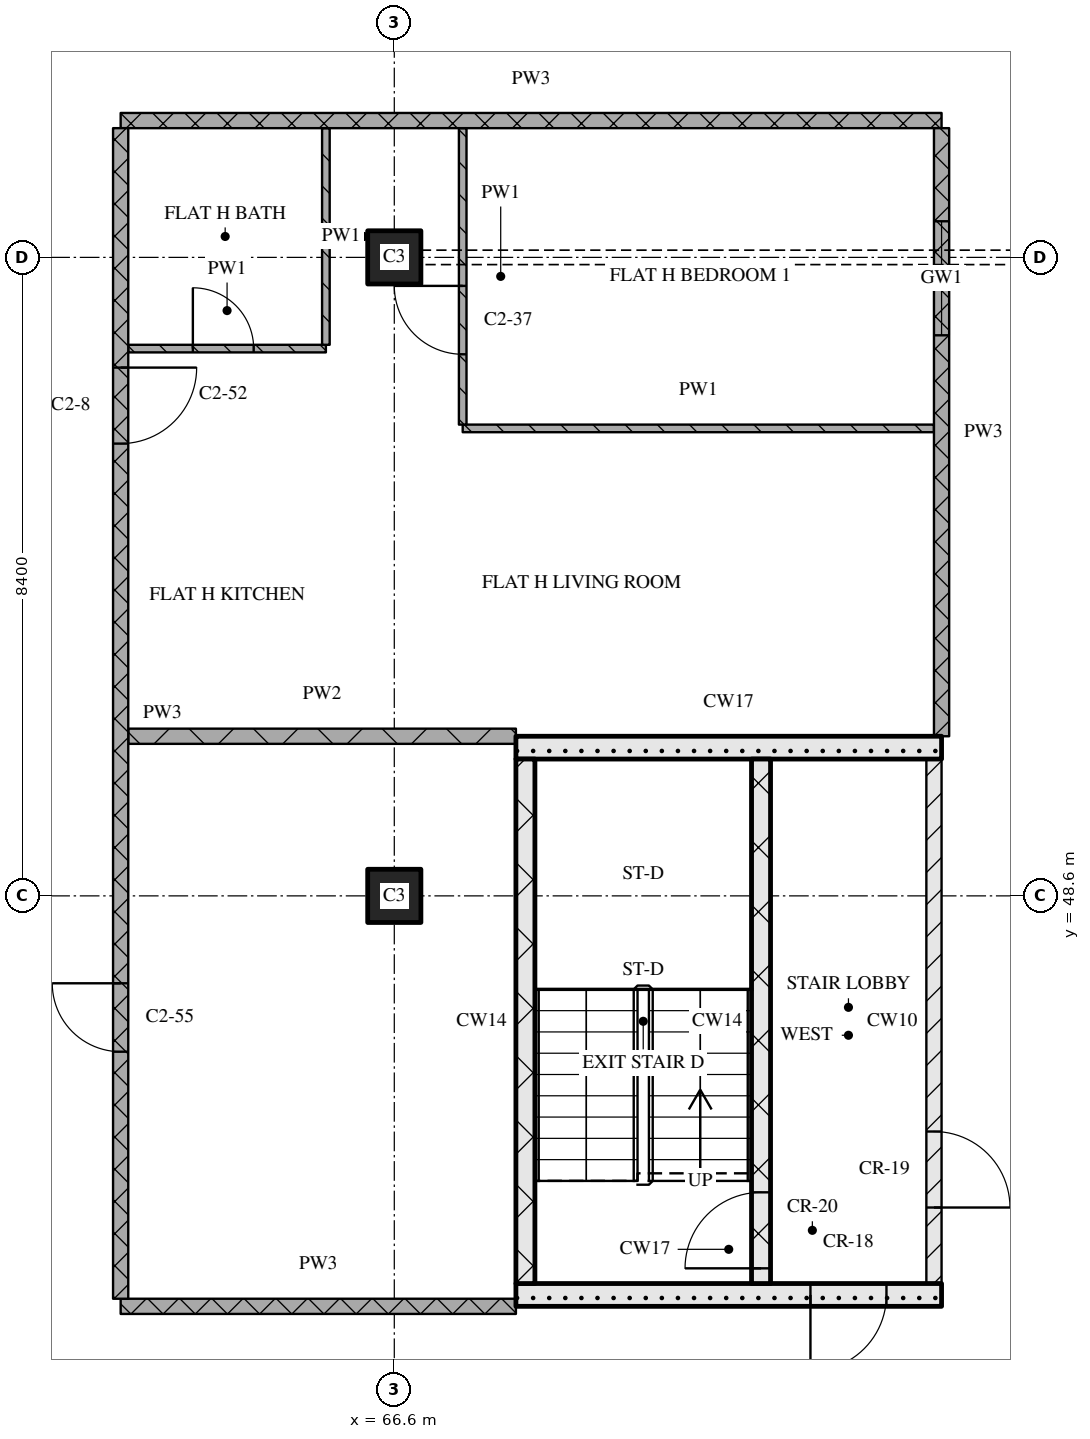
"""IFC4 building model, lengths in metres.
Left out: names, types, materials, properties, quantities, classifications, styles, units other than length and angle.
Written with IfcOpenShell. Run it as: python <this file> out.ifc"""

import sys

from ifc_helpers import new_model, si_unit, direction, frame, frame_2d, origin, origin_2d, place, context, subcontext, project, spatial, rectangle, extrude, element, fill, save


model = new_model("IFC4")
c1 = context("Model", 3, precision=1e-05, world=origin(), true_north=direction((0.0, 1.0)))
c2 = subcontext(c1, "Body", "Model", "MODEL_VIEW")
j1 = project(units=[si_unit("LENGTHUNIT", "METRE"), si_unit("PLANEANGLEUNIT", "RADIAN")], contexts=[c1])
p1 = place(None, origin())
s1 = spatial("IfcSite", under=j1, at=p1, CompositionType="ELEMENT")
p2 = place(p1, origin())
s2 = spatial("IfcBuilding", under=s1, at=p2, CompositionType="ELEMENT")
p3 = place(p2, frame((0.0, 0.0, 158.25)))
s3 = spatial("IfcBuildingStorey", under=s2, at=p3, CompositionType="ELEMENT", Elevation=158.25)
for number, where, z_axis, x_axis in (
    (1, (66.6, 48.6, 0.0), (0.0, 0.0, 1.0), (1.0, 0.0, 0.0)),
    (2, (66.6, 57.0, 0.0), (0.0, 0.0, 1.0), (1.0, 0.0, 0.0)),
):
    element("IfcColumn", number, at=place(p3, frame(where, z_axis=z_axis, x_axis=x_axis)), inside=s3, PredefinedType="COLUMN", context=c2, shape_type="SweptSolid", body=[
        extrude(rectangle(XDim=0.7, YDim=0.7, at=origin_2d()), origin(), (0.0, 0.0, 1.0), 3.6),
    ])
p4 = place(p3, frame((68.2, 43.35, 0.0), z_axis=(0.0, 0.0, 1.0), x_axis=(1.0, 0.0, 0.0)))
e3 = element("IfcWall", 3, at=p4, inside=s3, PredefinedType="SOLIDWALL", context=c2, shape_type="SweptSolid", body=[
    extrude(rectangle(XDim=5.6, YDim=0.3, at=frame_2d((2.8, 0.0))), origin(), (0.0, 0.0, 1.0), 3.32),
])
p5 = place(p4, frame((3.875, 0.0, 0.0)))
e4 = element("IfcOpeningElement", 4, at=p5, cuts=e3, PredefinedType="OPENING", context=c2, shape_type="SweptSolid", body=[
    extrude(rectangle(XDim=1.0, YDim=2.1, at=frame_2d((0.5, 1.05))), frame((0.0, 0.16, 0.0), z_axis=(0.0, -1.0, 0.0), x_axis=(1.0, 0.0, 0.0)), (0.0, 0.0, 1.0), 0.32),
])
p6 = place(p3, frame((68.325, 43.5, 0.0), z_axis=(0.0, 0.0, 1.0), x_axis=(0.0, 1.0, 0.0)))
e5 = element("IfcWall", 5, at=p6, inside=s3, PredefinedType="SOLIDWALL", context=c2, shape_type="SweptSolid", body=[
    extrude(rectangle(XDim=6.9, YDim=0.25, at=frame_2d((3.45, 0.0))), origin(), (0.0, 0.0, 1.0), 3.32),
])
p7 = place(p3, frame((71.425, 43.5, 0.0), z_axis=(0.0, 0.0, 1.0), x_axis=(0.0, 1.0, 0.0)))
e6 = element("IfcWall", 6, at=p7, inside=s3, PredefinedType="SOLIDWALL", context=c2, shape_type="SweptSolid", body=[
    extrude(rectangle(XDim=6.9, YDim=0.25, at=frame_2d((3.45, 0.0))), origin(), (0.0, 0.0, 1.0), 3.32),
])
p8 = place(p7, frame((0.2, 0.0, 0.0)))
e7 = element("IfcOpeningElement", 7, at=p8, cuts=e6, PredefinedType="OPENING", context=c2, shape_type="SweptSolid", body=[
    extrude(rectangle(XDim=1.0, YDim=2.1, at=frame_2d((0.5, 1.05))), frame((0.0, 0.135, 0.0), z_axis=(0.0, -1.0, 0.0), x_axis=(1.0, 0.0, 0.0)), (0.0, 0.0, 1.0), 0.27),
])
p9 = place(p3, frame((73.7, 43.5, 0.0), z_axis=(0.0, 0.0, 1.0), x_axis=(0.0, 1.0, 0.0)))
e8 = element("IfcWall", 8, at=p9, inside=s3, PredefinedType="PARTITIONING", context=c2, shape_type="SweptSolid", body=[
    extrude(rectangle(XDim=6.9, YDim=0.2, at=frame_2d((3.45, 0.0))), origin(), (0.0, 0.0, 1.0), 3.32),
])
p10 = place(p9, frame((1.0, 0.0, 0.0)))
e9 = element("IfcOpeningElement", 9, at=p10, cuts=e8, PredefinedType="OPENING", context=c2, shape_type="SweptSolid", body=[
    extrude(rectangle(XDim=1.0, YDim=2.1, at=frame_2d((0.5, 1.05))), frame((0.0, 0.11, 0.0), z_axis=(0.0, -1.0, 0.0), x_axis=(1.0, 0.0, 0.0)), (0.0, 0.0, 1.0), 0.22),
])
p11 = place(p3, frame((68.2, 50.55, 0.0), z_axis=(0.0, 0.0, 1.0), x_axis=(1.0, 0.0, 0.0)))
e10 = element("IfcWall", 10, at=p11, inside=s3, PredefinedType="SOLIDWALL", context=c2, shape_type="SweptSolid", body=[
    extrude(rectangle(XDim=5.6, YDim=0.3, at=frame_2d((2.8, 0.0))), origin(), (0.0, 0.0, 1.0), 3.32),
])
p12 = place(p3, frame((63.0, 43.2, 0.0), z_axis=(0.0, 0.0, 1.0), x_axis=(1.0, 0.0, 0.0)))
e11 = element("IfcWall", 11, at=p12, inside=s3, PredefinedType="PARTITIONING", context=c2, shape_type="SweptSolid", body=[
    extrude(rectangle(XDim=5.2, YDim=0.2, at=frame_2d((2.6, 0.0))), origin(), (0.0, 0.0, 1.0), 3.32),
])
p13 = place(p3, frame((63.1, 50.7, 0.0), z_axis=(0.0, 0.0, 1.0), x_axis=(1.0, 0.0, 0.0)))
e12 = element("IfcWall", 12, at=p13, inside=s3, PredefinedType="PARTITIONING", context=c2, shape_type="SweptSolid", body=[
    extrude(rectangle(XDim=5.1, YDim=0.2, at=frame_2d((2.55, 0.0))), origin(), (0.0, 0.0, 1.0), 3.32),
])
p14 = place(p3, frame((67.5, 54.75, 0.0), z_axis=(0.0, 0.0, 1.0), x_axis=(1.0, 0.0, 0.0)))
e13 = element("IfcWall", 13, at=p14, inside=s3, PredefinedType="PARTITIONING", context=c2, shape_type="SweptSolid", body=[
    extrude(rectangle(XDim=6.2, YDim=0.1, at=frame_2d((3.1, 0.0))), origin(), (0.0, 0.0, 1.0), 3.32),
])
p15 = place(p3, frame((63.1, 55.8, 0.0), z_axis=(0.0, 0.0, 1.0), x_axis=(1.0, 0.0, 0.0)))
e14 = element("IfcWall", 14, at=p15, inside=s3, PredefinedType="PARTITIONING", context=c2, shape_type="SweptSolid", body=[
    extrude(rectangle(XDim=2.6, YDim=0.1, at=frame_2d((1.3, 0.0))), origin(), (0.0, 0.0, 1.0), 3.32),
])
p16 = place(p15, frame((0.85, 0.0, 0.0)))
e15 = element("IfcOpeningElement", 15, at=p16, cuts=e14, PredefinedType="OPENING", context=c2, shape_type="SweptSolid", body=[
    extrude(rectangle(XDim=0.8, YDim=2.1, at=frame_2d((0.4, 1.05))), frame((0.0, 0.06, 0.0), z_axis=(0.0, -1.0, 0.0), x_axis=(1.0, 0.0, 0.0)), (0.0, 0.0, 1.0), 0.12),
])
p17 = place(p3, frame((63.0, 58.8, 0.0), z_axis=(0.0, 0.0, 1.0), x_axis=(1.0, 0.0, 0.0)))
e16 = element("IfcWall", 16, at=p17, inside=s3, PredefinedType="PARTITIONING", context=c2, shape_type="SweptSolid", body=[
    extrude(rectangle(XDim=10.8, YDim=0.2, at=frame_2d((5.4, 0.0))), origin(), (0.0, 0.0, 1.0), 3.32),
])
p18 = place(p3, frame((63.0, 58.7, 0.0), z_axis=(0.0, 0.0, 1.0), x_axis=(0.0, -1.0, 0.0)))
e17 = element("IfcWall", 17, at=p18, inside=s3, PredefinedType="PARTITIONING", context=c2, shape_type="SweptSolid", body=[
    extrude(rectangle(XDim=15.4, YDim=0.2, at=frame_2d((7.7, 0.0))), origin(), (0.0, 0.0, 1.0), 3.32),
])
p19 = place(p18, frame((3.15, 0.0, 0.0)))
e18 = element("IfcOpeningElement", 18, at=p19, cuts=e17, PredefinedType="OPENING", context=c2, shape_type="SweptSolid", body=[
    extrude(rectangle(XDim=1.0, YDim=2.1, at=frame_2d((0.5, 1.05))), frame((0.0, 0.11, 0.0), z_axis=(0.0, -1.0, 0.0), x_axis=(1.0, 0.0, 0.0)), (0.0, 0.0, 1.0), 0.22),
])
p20 = place(p18, frame((11.25, 0.0, 0.0)))
e19 = element("IfcOpeningElement", 19, at=p20, cuts=e17, PredefinedType="OPENING", context=c2, shape_type="SweptSolid", body=[
    extrude(rectangle(XDim=0.9, YDim=2.1, at=frame_2d((0.45, 1.05))), frame((0.0, 0.11, 0.0), z_axis=(0.0, -1.0, 0.0), x_axis=(1.0, 0.0, 0.0)), (0.0, 0.0, 1.0), 0.22),
])
p21 = place(p3, frame((65.7, 58.7, 0.0), z_axis=(0.0, 0.0, 1.0), x_axis=(0.0, -1.0, 0.0)))
e20 = element("IfcWall", 20, at=p21, inside=s3, PredefinedType="PARTITIONING", context=c2, shape_type="SweptSolid", body=[
    extrude(rectangle(XDim=2.85, YDim=0.1, at=frame_2d((1.425, 0.0))), origin(), (0.0, 0.0, 1.0), 3.32),
])
p22 = place(p3, frame((67.5, 58.7, 0.0), z_axis=(0.0, 0.0, 1.0), x_axis=(0.0, -1.0, 0.0)))
e21 = element("IfcWall", 21, at=p22, inside=s3, PredefinedType="PARTITIONING", context=c2, shape_type="SweptSolid", body=[
    extrude(rectangle(XDim=3.9, YDim=0.1, at=frame_2d((1.95, 0.0))), origin(), (0.0, 0.0, 1.0), 3.32),
])
p23 = place(p22, frame((2.075, 0.0, 0.0)))
e22 = element("IfcOpeningElement", 22, at=p23, cuts=e21, PredefinedType="OPENING", context=c2, shape_type="SweptSolid", body=[
    extrude(rectangle(XDim=0.9, YDim=2.1, at=frame_2d((0.45, 1.05))), frame((0.0, 0.06, 0.0), z_axis=(0.0, -1.0, 0.0), x_axis=(1.0, 0.0, 0.0)), (0.0, 0.0, 1.0), 0.12),
])
p24 = place(p3, frame((73.8, 58.7, 0.0), z_axis=(0.0, 0.0, 1.0), x_axis=(0.0, -1.0, 0.0)))
e23 = element("IfcWall", 23, at=p24, inside=s3, PredefinedType="PARTITIONING", context=c2, shape_type="SweptSolid", body=[
    extrude(rectangle(XDim=8.0, YDim=0.2, at=frame_2d((4.0, 0.0))), origin(), (0.0, 0.0, 1.0), 3.32),
])
p25 = place(p24, frame((1.225, 0.0, 0.9)))
e24 = element("IfcOpeningElement", 24, at=p25, cuts=e23, PredefinedType="OPENING", context=c2, shape_type="SweptSolid", body=[
    extrude(rectangle(XDim=1.5, YDim=1.5, at=frame_2d((0.75, 0.75))), frame((0.0, 0.11, 0.0), z_axis=(0.0, -1.0, 0.0), x_axis=(1.0, 0.0, 0.0)), (0.0, 0.0, 1.0), 0.22),
])
p26 = place(p5, origin())
e25 = element("IfcDoor", 25, at=p26, inside=s3, OperationType="SINGLE_SWING_RIGHT", PredefinedType="DOOR", context=c2, shape_type="SweptSolid", body=[
    extrude(rectangle(XDim=1.0, YDim=2.1, at=frame_2d((0.5, 1.05))), frame((0.0, 0.025, 0.0), z_axis=(0.0, -1.0, 0.0), x_axis=(1.0, 0.0, 0.0)), (0.0, 0.0, 1.0), 0.05),
])
fill(e4, e25)
p27 = place(p8, origin())
e26 = element("IfcDoor", 26, at=p27, inside=s3, OperationType="SINGLE_SWING_LEFT", PredefinedType="DOOR", context=c2, shape_type="SweptSolid", body=[
    extrude(rectangle(XDim=1.0, YDim=2.1, at=frame_2d((0.5, 1.05))), frame((0.0, 0.025, 0.0), z_axis=(0.0, -1.0, 0.0), x_axis=(1.0, 0.0, 0.0)), (0.0, 0.0, 1.0), 0.05),
])
fill(e7, e26)
p28 = place(p10, origin())
e27 = element("IfcDoor", 27, at=p28, inside=s3, OperationType="SINGLE_SWING_RIGHT", PredefinedType="DOOR", context=c2, shape_type="SweptSolid", body=[
    extrude(rectangle(XDim=1.0, YDim=2.1, at=frame_2d((0.5, 1.05))), frame((0.0, 0.025, 0.0), z_axis=(0.0, -1.0, 0.0), x_axis=(1.0, 0.0, 0.0)), (0.0, 0.0, 1.0), 0.05),
])
fill(e9, e27)
p29 = place(p16, origin())
e28 = element("IfcDoor", 28, at=p29, inside=s3, OperationType="SINGLE_SWING_LEFT", PredefinedType="DOOR", context=c2, shape_type="SweptSolid", body=[
    extrude(rectangle(XDim=0.8, YDim=2.1, at=frame_2d((0.4, 1.05))), frame((0.0, 0.025, 0.0), z_axis=(0.0, -1.0, 0.0), x_axis=(1.0, 0.0, 0.0)), (0.0, 0.0, 1.0), 0.05),
])
fill(e15, e28)
p30 = place(p19, origin())
e29 = element("IfcDoor", 29, at=p30, inside=s3, OperationType="SINGLE_SWING_LEFT", PredefinedType="DOOR", context=c2, shape_type="SweptSolid", body=[
    extrude(rectangle(XDim=1.0, YDim=2.1, at=frame_2d((0.5, 1.05))), frame((0.0, 0.025, 0.0), z_axis=(0.0, -1.0, 0.0), x_axis=(1.0, 0.0, 0.0)), (0.0, 0.0, 1.0), 0.05),
])
fill(e18, e29)
p31 = place(p20, origin())
e30 = element("IfcDoor", 30, at=p31, inside=s3, OperationType="SINGLE_SWING_RIGHT", PredefinedType="DOOR", context=c2, shape_type="SweptSolid", body=[
    extrude(rectangle(XDim=0.9, YDim=2.1, at=frame_2d((0.45, 1.05))), frame((0.0, 0.025, 0.0), z_axis=(0.0, -1.0, 0.0), x_axis=(1.0, 0.0, 0.0)), (0.0, 0.0, 1.0), 0.05),
])
fill(e19, e30)
p32 = place(p23, origin())
e31 = element("IfcDoor", 31, at=p32, inside=s3, OperationType="SINGLE_SWING_RIGHT", PredefinedType="DOOR", context=c2, shape_type="SweptSolid", body=[
    extrude(rectangle(XDim=0.9, YDim=2.1, at=frame_2d((0.45, 1.05))), frame((0.0, 0.025, 0.0), z_axis=(0.0, -1.0, 0.0), x_axis=(1.0, 0.0, 0.0)), (0.0, 0.0, 1.0), 0.05),
])
fill(e22, e31)
p33 = place(p25, origin())
e32 = element("IfcWindow", 32, at=p33, inside=s3, PartitioningType="SINGLE_PANEL", PredefinedType="WINDOW", context=c2, shape_type="SweptSolid", body=[
    extrude(rectangle(XDim=1.5, YDim=1.5, at=frame_2d((0.75, 0.75))), frame((0.0, 0.03, 0.0), z_axis=(0.0, -1.0, 0.0), x_axis=(1.0, 0.0, 0.0)), (0.0, 0.0, 1.0), 0.06),
])
fill(e24, e32)
save(model, sys.argv[1])
